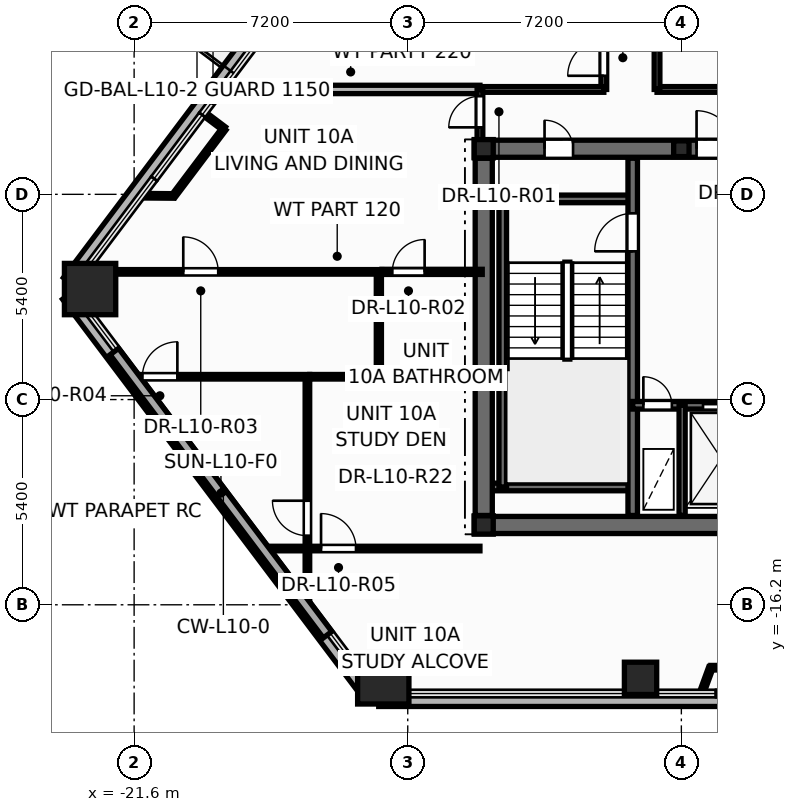
"""IFC4 building model, lengths in metres.
Left out: names, types, materials, properties, quantities, classifications, styles, units other than length and angle.
Written with IfcOpenShell. Run it as: python <this file> out.ifc"""

import sys

from ifc_helpers import new_model, si_unit, direction, frame, frame_2d, origin, origin_2d, place, context, subcontext, project, spatial, rectangle, hollow_rectangle, hollow_circle, i_section, extrude, element, fill, save


model = new_model("IFC4")
c1 = context("Model", 3, precision=1e-05, world=origin(), true_north=direction((0.0, 1.0)))
c2 = subcontext(c1, "Body", "Model", "MODEL_VIEW")
j1 = project(units=[si_unit("LENGTHUNIT", "METRE"), si_unit("PLANEANGLEUNIT", "RADIAN")], contexts=[c1])
p1 = place(None, origin())
s1 = spatial("IfcSite", under=j1, at=p1, CompositionType="ELEMENT")
p2 = place(p1, origin())
s2 = spatial("IfcBuilding", under=s1, at=p2, CompositionType="ELEMENT")
p3 = place(p2, frame((0.0, 0.0, 42.3)))
s3 = spatial("IfcBuildingStorey", under=s2, at=p3, CompositionType="ELEMENT", Elevation=42.3)
for number, where, z_axis, x_axis in (
    (1, (-22.759, -7.892, 0.0), (0.0, 0.0, 1.0), (1.0, 0.0, 0.0)),
    (2, (-15.044, -18.135, 0.0), (0.0, 0.0, 1.0), (1.0, 0.0, 0.0)),
):
    element("IfcColumn", number, at=place(p3, frame(where, z_axis=z_axis, x_axis=x_axis)), inside=s3, PredefinedType="COLUMN", context=c2, shape_type="SweptSolid", body=[
        extrude(hollow_rectangle(XDim=1.35, YDim=1.35, WallThickness=0.065, at=origin_2d()), origin(), (0.0, 0.0, 1.0), 3.6),
    ])
p4 = place(p3, frame((-8.274, -18.135, 0.0), z_axis=(0.0, 0.0, 1.0), x_axis=(1.0, 0.0, 0.0)))
e3 = element("IfcColumn", 3, at=p4, inside=s3, PredefinedType="COLUMN", context=c2, shape_type="SweptSolid", body=[
    extrude(hollow_circle(Radius=0.425, WallThickness=0.038, at=origin_2d()), origin(), (0.0, 0.0, 1.0), 3.6),
])
for number, where, z_axis, x_axis in (
    (4, (-12.4, -14.1, 0.0), (0.0, 0.0, 1.0), (1.0, 0.0, 0.0)),
    (5, (-12.4, -4.2, 0.0), (0.0, 0.0, 1.0), (1.0, 0.0, 0.0)),
):
    element("IfcColumn", number, at=place(p3, frame(where, z_axis=z_axis, x_axis=x_axis)), inside=s3, PredefinedType="COLUMN", context=c2, shape_type="SweptSolid", body=[
        extrude(i_section(OverallWidth=0.5, OverallDepth=0.482, WebThickness=0.04, FlangeThickness=0.045, at=origin_2d()), origin(), (0.0, 0.0, 1.0), 3.6),
    ])
p5 = place(p3, frame((-7.2, -4.2, 0.0), z_axis=(0.0, 0.0, 1.0), x_axis=(1.0, 0.0, 0.0)))
e6 = element("IfcColumn", 6, at=p5, inside=s3, PredefinedType="PILASTER", context=c2, shape_type="SweptSolid", body=[
    extrude(i_section(OverallWidth=0.405, OverallDepth=0.414, WebThickness=0.022, FlangeThickness=0.032, at=origin_2d()), origin(), (0.0, 0.0, 1.0), 3.6),
])
p6 = place(p3, frame((-23.34, -8.052, -0.2), z_axis=(0.0, 0.0, 1.0), x_axis=(0.601636636194, -0.798769903032, 0.0)))
e7 = element("IfcWall", 7, at=p6, inside=s3, PredefinedType="PARAPET", context=c2, shape_type="SweptSolid", body=[
    extrude(rectangle(XDim=13.165, YDim=0.36, at=frame_2d((6.583, 0.0))), origin(), (0.0, 0.0, 1.0), 0.38),
])
p7 = place(p3, frame((-15.163, -18.696, -0.2), z_axis=(0.0, 0.0, 1.0), x_axis=(1.0, 0.0, 0.0)))
e8 = element("IfcWall", 8, at=p7, inside=s3, PredefinedType="PARAPET", context=c2, shape_type="SweptSolid", body=[
    extrude(rectangle(XDim=30.327, YDim=0.36, at=frame_2d((15.163, 0.0))), origin(), (0.0, 0.0, 1.0), 0.38),
])
p8 = place(p3, frame((-15.988, 2.029, -0.2), z_axis=(0.0, 0.0, 1.0), x_axis=(-0.601631217198, -0.798773984612, 0.0)))
e9 = element("IfcWall", 9, at=p8, inside=s3, PredefinedType="PARAPET", context=c2, shape_type="SweptSolid", body=[
    extrude(rectangle(XDim=12.18, YDim=0.36, at=frame_2d((6.09, 0.0))), origin(), (0.0, 0.0, 1.0), 0.38),
])
p9 = place(p3, frame((-12.65, -14.1, 0.0), z_axis=(0.0, 0.0, 1.0), x_axis=(1.0, 0.0, 0.0)))
e10 = element("IfcWall", 10, at=p9, inside=s3, PredefinedType="SHEAR", context=c2, shape_type="SweptSolid", body=[
    extrude(rectangle(XDim=25.3, YDim=0.45, at=frame_2d((12.65, 0.0))), origin(), (0.0, 0.0, 1.0), 3.6),
])
p10 = place(p3, frame((-12.65, -4.2, 0.0), z_axis=(0.0, 0.0, 1.0), x_axis=(1.0, 0.0, 0.0)))
e11 = element("IfcWall", 11, at=p10, inside=s3, PredefinedType="SHEAR", context=c2, shape_type="SweptSolid", body=[
    extrude(rectangle(XDim=25.3, YDim=0.45, at=frame_2d((12.65, 0.0))), origin(), (0.0, 0.0, 1.0), 3.6),
])
p11 = place(p10, frame((1.85, 0.0, 0.0)))
e12 = element("IfcOpeningElement", 12, at=p11, cuts=e11, PredefinedType="OPENING", context=c2, shape_type="SweptSolid", body=[
    extrude(rectangle(XDim=0.756, YDim=2.054, at=frame_2d((0.375, 1.027))), frame((0.0, 0.235, 0.0), z_axis=(0.0, -1.0, 0.0), x_axis=(1.0, 0.0, 0.0)), (0.0, 0.0, 1.0), 0.47),
])
p12 = place(p10, frame((21.85, 0.0, 0.0)))
e13 = element("IfcOpeningElement", 13, at=p12, cuts=e11, PredefinedType="OPENING", context=c2, shape_type="SweptSolid", body=[
    extrude(rectangle(XDim=0.756, YDim=2.054, at=frame_2d((0.375, 1.027))), frame((0.0, 0.235, 0.0), z_axis=(0.0, -1.0, 0.0), x_axis=(1.0, 0.0, 0.0)), (0.0, 0.0, 1.0), 0.47),
])
p13 = place(p10, frame((23.5, 0.0, 0.0)))
e14 = element("IfcOpeningElement", 14, at=p13, cuts=e11, PredefinedType="OPENING", context=c2, shape_type="SweptSolid", body=[
    extrude(rectangle(XDim=0.756, YDim=2.054, at=frame_2d((0.375, 1.027))), frame((0.0, 0.235, 0.0), z_axis=(0.0, -1.0, 0.0), x_axis=(1.0, 0.0, 0.0)), (0.0, 0.0, 1.0), 0.47),
])
p14 = place(p10, frame((5.85, 0.0, 0.0)))
e15 = element("IfcOpeningElement", 15, at=p14, cuts=e11, PredefinedType="OPENING", context=c2, shape_type="SweptSolid", body=[
    extrude(rectangle(XDim=1.006, YDim=2.104, at=frame_2d((0.5, 1.052))), frame((0.0, 0.235, 0.0), z_axis=(0.0, -1.0, 0.0), x_axis=(1.0, 0.0, 0.0)), (0.0, 0.0, 1.0), 0.47),
])
p15 = place(p10, frame((10.35, 0.0, 0.0)))
e16 = element("IfcOpeningElement", 16, at=p15, cuts=e11, PredefinedType="OPENING", context=c2, shape_type="SweptSolid", body=[
    extrude(rectangle(XDim=1.406, YDim=2.154, at=frame_2d((0.7, 1.077))), frame((0.0, 0.235, 0.0), z_axis=(0.0, -1.0, 0.0), x_axis=(1.0, 0.0, 0.0)), (0.0, 0.0, 1.0), 0.47),
])
p16 = place(p10, frame((18.45, 0.0, 0.0)))
e17 = element("IfcOpeningElement", 17, at=p16, cuts=e11, PredefinedType="OPENING", context=c2, shape_type="SweptSolid", body=[
    extrude(rectangle(XDim=1.006, YDim=2.104, at=frame_2d((0.5, 1.052))), frame((0.0, 0.235, 0.0), z_axis=(0.0, -1.0, 0.0), x_axis=(1.0, 0.0, 0.0)), (0.0, 0.0, 1.0), 0.47),
])
for number, where, z_axis, x_axis in (
    (18, (-12.35, -5.52, 0.0), (0.0, 0.0, 1.0), (1.0, 0.0, 0.0)),
    (19, (-12.35, -13.1, 0.0), (0.0, 0.0, 1.0), (1.0, 0.0, 0.0)),
):
    element("IfcWall", number, at=place(p3, frame(where, z_axis=z_axis, x_axis=x_axis)), inside=s3, PredefinedType="SOLIDWALL", context=c2, shape_type="SweptSolid", body=[
        extrude(rectangle(XDim=3.87, YDim=0.2, at=frame_2d((1.935, 0.0))), origin(), (0.0, 0.0, 1.0), 3.6),
    ])
p17 = place(p3, frame((-11.9, -13.1, 0.0), z_axis=(0.0, 0.0, 1.0), x_axis=(0.0, 1.0, 0.0)))
e20 = element("IfcWall", 20, at=p17, inside=s3, PredefinedType="SOLIDWALL", context=c2, shape_type="SweptSolid", body=[
    extrude(rectangle(XDim=7.58, YDim=0.2, at=frame_2d((3.79, 0.0))), origin(), (0.0, 0.0, 1.0), 3.6),
])
p18 = place(p3, frame((-8.48, -13.85, 0.0), z_axis=(0.0, 0.0, 1.0), x_axis=(0.0, 1.0, 0.0)))
e21 = element("IfcWall", 21, at=p18, inside=s3, PredefinedType="SHEAR", context=c2, shape_type="SweptSolid", body=[
    extrude(rectangle(XDim=9.4, YDim=0.25, at=frame_2d((4.7, 0.0))), origin(), (0.0, 0.0, 1.0), 3.6),
])
p19 = place(p18, frame((6.95, 0.0, 0.0)))
e22 = element("IfcOpeningElement", 22, at=p19, cuts=e21, PredefinedType="OPENING", context=c2, shape_type="SweptSolid", body=[
    extrude(rectangle(XDim=1.006, YDim=2.104, at=frame_2d((0.5, 1.052))), frame((0.0, 0.135, 0.0), z_axis=(0.0, -1.0, 0.0), x_axis=(1.0, 0.0, 0.0)), (0.0, 0.0, 1.0), 0.27),
])
p20 = place(p3, frame((-8.48, -10.95, 0.0), z_axis=(0.0, 0.0, 1.0), x_axis=(1.0, 0.0, 0.0)))
e23 = element("IfcWall", 23, at=p20, inside=s3, PredefinedType="SOLIDWALL", context=c2, shape_type="SweptSolid", body=[
    extrude(rectangle(XDim=3.36, YDim=0.2, at=frame_2d((1.68, 0.0))), origin(), (0.0, 0.0, 1.0), 3.6),
])
p21 = place(p20, frame((0.28, 0.0, 0.0)))
e24 = element("IfcOpeningElement", 24, at=p21, cuts=e23, PredefinedType="OPENING", context=c2, shape_type="SweptSolid", body=[
    extrude(rectangle(XDim=0.756, YDim=2.054, at=frame_2d((0.375, 1.027))), frame((0.0, 0.11, 0.0), z_axis=(0.0, -1.0, 0.0), x_axis=(1.0, 0.0, 0.0)), (0.0, 0.0, 1.0), 0.22),
])
p22 = place(p20, frame((1.85, 0.0, 0.0)))
e25 = element("IfcOpeningElement", 25, at=p22, cuts=e23, PredefinedType="OPENING", context=c2, shape_type="SweptSolid", body=[
    extrude(rectangle(XDim=1.106, YDim=2.104, at=frame_2d((0.55, 1.052))), frame((0.0, 0.11, 0.0), z_axis=(0.0, -1.0, 0.0), x_axis=(1.0, 0.0, 0.0)), (0.0, 0.0, 1.0), 0.22),
])
p23 = place(p3, frame((-7.18, -13.85, 0.0), z_axis=(0.0, 0.0, 1.0), x_axis=(0.0, 1.0, 0.0)))
e26 = element("IfcWall", 26, at=p23, inside=s3, PredefinedType="PARTITIONING", context=c2, shape_type="SweptSolid", body=[
    extrude(rectangle(XDim=2.9, YDim=0.16, at=frame_2d((1.45, 0.0))), origin(), (0.0, 0.0, 1.0), 2.375),
])
p24 = place(p3, frame((-12.4, -13.85, 0.0), z_axis=(0.0, 0.0, 1.0), x_axis=(0.0, 1.0, 0.0)))
e27 = element("IfcWall", 27, at=p24, inside=s3, PredefinedType="SHEAR", context=c2, shape_type="SweptSolid", body=[
    extrude(rectangle(XDim=9.4, YDim=0.45, at=frame_2d((4.7, 0.0))), origin(), (0.0, 0.0, 1.0), 3.6),
])
p25 = place(p3, frame((-22.919, -7.44, 0.0), z_axis=(0.0, 0.0, 1.0), x_axis=(1.0, 0.0, 0.0)))
e28 = element("IfcWall", 28, at=p25, inside=s3, PredefinedType="PARTITIONING", context=c2, shape_type="SweptSolid", body=[
    extrude(rectangle(XDim=7.839, YDim=0.12, at=frame_2d((3.919, 0.0))), origin(), (0.0, 0.0, 1.0), 2.325),
])
p26 = place(p25, frame((2.612, 0.0, 0.0)))
e29 = element("IfcOpeningElement", 29, at=p26, cuts=e28, PredefinedType="OPENING", context=c2, shape_type="SweptSolid", body=[
    extrude(rectangle(XDim=0.926, YDim=2.104, at=frame_2d((0.46, 1.052))), frame((0.0, 0.07, 0.0), z_axis=(0.0, -1.0, 0.0), x_axis=(1.0, 0.0, 0.0)), (0.0, 0.0, 1.0), 0.14),
])
p27 = place(p3, frame((-7.84, -2.64, 0.0), z_axis=(0.0, 0.0, 1.0), x_axis=(1.0, 0.0, 0.0)))
e30 = element("IfcWall", 30, at=p27, inside=s3, PredefinedType="PARTITIONING", context=c2, shape_type="SweptSolid", body=[
    extrude(rectangle(XDim=7.7, YDim=0.15, at=frame_2d((3.85, 0.0))), origin(), (0.0, 0.0, 1.0), 2.325),
])
p28 = place(p27, frame((2.117, 0.0, 0.0)))
e31 = element("IfcOpeningElement", 31, at=p28, cuts=e30, PredefinedType="OPENING", context=c2, shape_type="SweptSolid", body=[
    extrude(rectangle(XDim=0.956, YDim=2.104, at=frame_2d((0.475, 1.052))), frame((0.0, 0.085, 0.0), z_axis=(0.0, -1.0, 0.0), x_axis=(1.0, 0.0, 0.0)), (0.0, 0.0, 1.0), 0.17),
])
p29 = place(p3, frame((-9.24, -2.64, 0.0), z_axis=(0.0, 0.0, 1.0), x_axis=(0.0, 1.0, 0.0)))
e32 = element("IfcWall", 32, at=p29, inside=s3, PredefinedType="PARTITIONING", context=c2, shape_type="SweptSolid", body=[
    extrude(rectangle(XDim=6.9, YDim=0.15, at=frame_2d((3.45, 0.0))), origin(), (0.0, 0.0, 1.0), 2.509),
])
p30 = place(p29, frame((0.36, 0.0, 0.0)))
e33 = element("IfcOpeningElement", 33, at=p30, cuts=e32, PredefinedType="OPENING", context=c2, shape_type="SweptSolid", body=[
    extrude(rectangle(XDim=0.956, YDim=2.104, at=frame_2d((0.475, 1.052))), frame((0.0, 0.085, 0.0), z_axis=(0.0, -1.0, 0.0), x_axis=(1.0, 0.0, 0.0)), (0.0, 0.0, 1.0), 0.17),
])
p31 = place(p3, frame((-19.304, -2.64, 0.0), z_axis=(0.0, 0.0, 1.0), x_axis=(1.0, 0.0, 0.0)))
e34 = element("IfcWall", 34, at=p31, inside=s3, PredefinedType="PARTITIONING", context=c2, shape_type="SweptSolid", body=[
    extrude(rectangle(XDim=6.804, YDim=0.22, at=frame_2d((3.402, 0.0))), origin(), (0.0, 0.0, 1.0), 2.713),
])
p32 = place(p3, frame((-7.84, -2.64, 0.0), z_axis=(0.0, 0.0, 1.0), x_axis=(0.0, 1.0, 0.0)))
e35 = element("IfcWall", 35, at=p32, inside=s3, PredefinedType="PARTITIONING", context=c2, shape_type="SweptSolid", body=[
    extrude(rectangle(XDim=8.84, YDim=0.15, at=frame_2d((4.42, 0.0))), origin(), (0.0, 0.0, 1.0), 2.509),
])
p33 = place(p3, frame((-17.04, -16.15, 0.0), z_axis=(0.0, 0.0, 1.0), x_axis=(0.0, 1.0, 0.0)))
e36 = element("IfcWall", 36, at=p33, inside=s3, PredefinedType="PARTITIONING", context=c2, shape_type="SweptSolid", body=[
    extrude(rectangle(XDim=5.95, YDim=0.12, at=frame_2d((2.975, 0.0))), origin(), (0.0, 0.0, 1.0), 2.713),
])
p34 = place(p33, frame((1.769, 0.0, 0.0)))
e37 = element("IfcOpeningElement", 37, at=p34, cuts=e36, PredefinedType="OPENING", context=c2, shape_type="SweptSolid", body=[
    extrude(rectangle(XDim=0.926, YDim=2.104, at=frame_2d((0.46, 1.052))), frame((0.0, 0.07, 0.0), z_axis=(0.0, -1.0, 0.0), x_axis=(1.0, 0.0, 0.0)), (0.0, 0.0, 1.0), 0.14),
])
p35 = place(p3, frame((-18.117, -14.72, 0.0), z_axis=(0.0, 0.0, 1.0), x_axis=(1.0, 0.0, 0.0)))
e38 = element("IfcWall", 38, at=p35, inside=s3, PredefinedType="PARTITIONING", context=c2, shape_type="SweptSolid", body=[
    extrude(rectangle(XDim=5.617, YDim=0.12, at=frame_2d((2.809, 0.0))), origin(), (0.0, 0.0, 1.0), 2.713),
])
p36 = place(p35, frame((1.436, 0.0, 0.0)))
e39 = element("IfcOpeningElement", 39, at=p36, cuts=e38, PredefinedType="OPENING", context=c2, shape_type="SweptSolid", body=[
    extrude(rectangle(XDim=0.926, YDim=2.104, at=frame_2d((0.46, 1.052))), frame((0.0, 0.07, 0.0), z_axis=(0.0, -1.0, 0.0), x_axis=(1.0, 0.0, 0.0)), (0.0, 0.0, 1.0), 0.14),
])
p37 = place(p3, frame((-21.522, -10.2, 0.0), z_axis=(0.0, 0.0, 1.0), x_axis=(1.0, 0.0, 0.0)))
e40 = element("IfcWall", 40, at=p37, inside=s3, PredefinedType="PARTITIONING", context=c2, shape_type="SweptSolid", body=[
    extrude(rectangle(XDim=4.542, YDim=0.12, at=frame_2d((2.271, 0.0))), origin(), (0.0, 0.0, 1.0), 2.713),
])
p38 = place(p37, frame((0.14, 0.0, 0.0)))
e41 = element("IfcOpeningElement", 41, at=p38, cuts=e40, PredefinedType="OPENING", context=c2, shape_type="SweptSolid", body=[
    extrude(rectangle(XDim=0.926, YDim=2.104, at=frame_2d((0.46, 1.052))), frame((0.0, 0.07, 0.0), z_axis=(0.0, -1.0, 0.0), x_axis=(1.0, 0.0, 0.0)), (0.0, 0.0, 1.0), 0.14),
])
p39 = place(p3, frame((-6.425, -17.856, 0.0), z_axis=(0.0, 0.0, 1.0), x_axis=(1.0, 0.0, 0.0)))
e42 = element("IfcWall", 42, at=p39, inside=s3, PredefinedType="PARTITIONING", context=c2, shape_type="SweptSolid", body=[
    extrude(rectangle(XDim=3.868, YDim=0.12, at=frame_2d((1.934, 0.0))), origin(), (0.0, 0.0, 1.0), 3.35),
])
p40 = place(p3, frame((-12.5, -2.64, 0.0), z_axis=(0.0, 0.0, 1.0), x_axis=(1.0, 0.0, 0.0)))
e43 = element("IfcWall", 43, at=p40, inside=s3, PredefinedType="PARTITIONING", context=c2, shape_type="SweptSolid", body=[
    extrude(rectangle(XDim=3.26, YDim=0.15, at=frame_2d((1.63, 0.0))), origin(), (0.0, 0.0, 1.0), 3.35),
])
p41 = place(p3, frame((-15.078, -7.44, 0.0), z_axis=(0.0, 0.0, 1.0), x_axis=(1.0, 0.0, 0.0)))
e44 = element("IfcWall", 44, at=p41, inside=s3, PredefinedType="PARTITIONING", context=c2, shape_type="SweptSolid", body=[
    extrude(rectangle(XDim=2.638, YDim=0.135, at=frame_2d((1.319, 0.0))), origin(), (0.0, 0.0, 1.0), 2.713),
])
p42 = place(p41, frame((0.272, 0.0, 0.0)))
e45 = element("IfcOpeningElement", 45, at=p42, cuts=e44, PredefinedType="OPENING", context=c2, shape_type="SweptSolid", body=[
    extrude(rectangle(XDim=0.856, YDim=2.104, at=frame_2d((0.425, 1.052))), frame((0.0, 0.078, 0.0), z_axis=(0.0, -1.0, 0.0), x_axis=(1.0, 0.0, 0.0)), (0.0, 0.0, 1.0), 0.155),
])
p43 = place(p3, frame((-15.16, -10.2, 0.0), z_axis=(0.0, 0.0, 1.0), x_axis=(0.0, 1.0, 0.0)))
e46 = element("IfcWall", 46, at=p43, inside=s3, PredefinedType="PARTITIONING", context=c2, shape_type="SweptSolid", body=[
    extrude(rectangle(XDim=2.76, YDim=0.135, at=frame_2d((1.38, 0.0))), origin(), (0.0, 0.0, 1.0), 3.35),
])
p44 = place(p3, frame((-15.16, -10.2, 0.0), z_axis=(0.0, 0.0, 1.0), x_axis=(1.0, 0.0, 0.0)))
e47 = element("IfcWall", 47, at=p44, inside=s3, PredefinedType="PARTITIONING", context=c2, shape_type="SweptSolid", body=[
    extrude(rectangle(XDim=2.72, YDim=0.135, at=frame_2d((1.36, 0.0))), origin(), (0.0, 0.0, 1.0), 2.713),
])
p45 = place(p3, frame((-19.231, -3.674, 0.0), z_axis=(0.0, 0.0, 1.0), x_axis=(-0.60167490335, -0.798741078622, 0.0)))
e48 = element("IfcWall", 48, at=p45, inside=s3, PredefinedType="PARTITIONING", context=c2, shape_type="SweptSolid", body=[
    extrude(rectangle(XDim=2.214, YDim=0.12, at=frame_2d((1.107, 0.0))), origin(), (0.0, 0.0, 1.0), 3.35),
])
p46 = place(p3, frame((-16.978, -10.2, 0.0), z_axis=(0.0, 0.0, 1.0), x_axis=(1.0, 0.0, 0.0)))
e49 = element("IfcWall", 49, at=p46, inside=s3, PredefinedType="PARTITIONING", context=c2, shape_type="SweptSolid", body=[
    extrude(rectangle(XDim=1.818, YDim=0.12, at=frame_2d((0.909, 0.0))), origin(), (0.0, 0.0, 1.0), 3.35),
])
p47 = place(p3, frame((-12.5, -4.24, 0.0), z_axis=(0.0, 0.0, 1.0), x_axis=(0.0, 1.0, 0.0)))
e50 = element("IfcWall", 50, at=p47, inside=s3, PredefinedType="PARTITIONING", context=c2, shape_type="SweptSolid", body=[
    extrude(rectangle(XDim=1.6, YDim=0.15, at=frame_2d((0.8, 0.0))), origin(), (0.0, 0.0, 1.0), 2.325),
])
p48 = place(p47, frame((0.602, 0.0, 0.0)))
e51 = element("IfcOpeningElement", 51, at=p48, cuts=e50, PredefinedType="OPENING", context=c2, shape_type="SweptSolid", body=[
    extrude(rectangle(XDim=0.826, YDim=2.104, at=frame_2d((0.41, 1.052))), frame((0.0, 0.085, 0.0), z_axis=(0.0, -1.0, 0.0), x_axis=(1.0, 0.0, 0.0)), (0.0, 0.0, 1.0), 0.17),
])
p49 = place(p3, frame((-20.563, -5.442, 0.0), z_axis=(0.0, 0.0, 1.0), x_axis=(-0.999971035762, 0.007611020764, 0.0)))
e52 = element("IfcWall", 52, at=p49, inside=s3, PredefinedType="PARTITIONING", context=c2, shape_type="SweptSolid", body=[
    extrude(rectangle(XDim=0.834, YDim=0.12, at=frame_2d((0.417, 0.0))), origin(), (0.0, 0.0, 1.0), 2.713),
])
p50 = place(p3, frame((-6.671, -18.526, 0.0), z_axis=(0.0, 0.0, 1.0), x_axis=(0.344516001637, 0.938780445374, 0.0)))
e53 = element("IfcWall", 53, at=p50, inside=s3, PredefinedType="PARTITIONING", context=c2, shape_type="SweptSolid", body=[
    extrude(rectangle(XDim=0.714, YDim=0.12, at=frame_2d((0.357, 0.0))), origin(), (0.0, 0.0, 1.0), 2.713),
])
p51 = place(p3, frame((-19.767, -3.271, 0.0), z_axis=(0.0, 0.0, 1.0), x_axis=(0.798905778506, -0.601456197133, 0.0)))
e54 = element("IfcWall", 54, at=p51, inside=s3, PredefinedType="PARTITIONING", context=c2, shape_type="SweptSolid", body=[
    extrude(rectangle(XDim=0.67, YDim=0.12, at=frame_2d((0.335, 0.0))), origin(), (0.0, 0.0, 1.0), 2.713),
])
p52 = place(p19, origin())
e55 = element("IfcDoor", 55, at=p52, inside=s3, OperationType="SINGLE_SWING_LEFT", PredefinedType="DOOR", context=c2, shape_type="SweptSolid", body=[
    extrude(rectangle(XDim=1.0, YDim=2.1, at=frame_2d((0.5, 1.05))), frame((0.0, 0.025, 0.0), z_axis=(0.0, -1.0, 0.0), x_axis=(1.0, 0.0, 0.0)), (0.0, 0.0, 1.0), 0.05),
])
fill(e22, e55)
p53 = place(p21, origin())
e56 = element("IfcDoor", 56, at=p53, inside=s3, OperationType="SINGLE_SWING_LEFT", PredefinedType="DOOR", context=c2, shape_type="SweptSolid", body=[
    extrude(rectangle(XDim=0.75, YDim=2.05, at=frame_2d((0.375, 1.025))), frame((0.0, 0.025, 0.0), z_axis=(0.0, -1.0, 0.0), x_axis=(1.0, 0.0, 0.0)), (0.0, 0.0, 1.0), 0.05),
])
fill(e24, e56)
p54 = place(p22, origin())
e57 = element("IfcDoor", 57, at=p54, inside=s3, OperationType="DOUBLE_DOOR_SLIDING", PredefinedType="DOOR", context=c2, shape_type="SweptSolid", body=[
    extrude(rectangle(XDim=1.1, YDim=2.1, at=frame_2d((0.55, 1.05))), frame((0.0, 0.025, 0.0), z_axis=(0.0, -1.0, 0.0), x_axis=(1.0, 0.0, 0.0)), (0.0, 0.0, 1.0), 0.05),
])
fill(e25, e57)
p55 = place(p11, origin())
e58 = element("IfcDoor", 58, at=p55, inside=s3, OperationType="SINGLE_SWING_LEFT", PredefinedType="DOOR", context=c2, shape_type="SweptSolid", body=[
    extrude(rectangle(XDim=0.75, YDim=2.05, at=frame_2d((0.375, 1.025))), frame((0.0, 0.025, 0.0), z_axis=(0.0, -1.0, 0.0), x_axis=(1.0, 0.0, 0.0)), (0.0, 0.0, 1.0), 0.05),
])
fill(e12, e58)
p56 = place(p14, origin())
e59 = element("IfcDoor", 59, at=p56, inside=s3, OperationType="SINGLE_SWING_LEFT", PredefinedType="DOOR", context=c2, shape_type="SweptSolid", body=[
    extrude(rectangle(XDim=1.0, YDim=2.1, at=frame_2d((0.5, 1.05))), frame((0.0, 0.025, 0.0), z_axis=(0.0, -1.0, 0.0), x_axis=(1.0, 0.0, 0.0)), (0.0, 0.0, 1.0), 0.05),
])
fill(e15, e59)
p57 = place(p48, origin())
e60 = element("IfcDoor", 60, at=p57, inside=s3, OperationType="SINGLE_SWING_LEFT", PredefinedType="DOOR", context=c2, shape_type="SweptSolid", body=[
    extrude(rectangle(XDim=0.82, YDim=2.1, at=frame_2d((0.41, 1.05))), frame((0.0, 0.025, 0.0), z_axis=(0.0, -1.0, 0.0), x_axis=(1.0, 0.0, 0.0)), (0.0, 0.0, 1.0), 0.05),
])
fill(e51, e60)
p58 = place(p42, origin())
e61 = element("IfcDoor", 61, at=p58, inside=s3, OperationType="SINGLE_SWING_RIGHT", PredefinedType="DOOR", context=c2, shape_type="SweptSolid", body=[
    extrude(rectangle(XDim=0.85, YDim=2.1, at=frame_2d((0.425, 1.05))), frame((0.0, 0.025, 0.0), z_axis=(0.0, -1.0, 0.0), x_axis=(1.0, 0.0, 0.0)), (0.0, 0.0, 1.0), 0.05),
])
fill(e45, e61)
p59 = place(p26, origin())
e62 = element("IfcDoor", 62, at=p59, inside=s3, OperationType="SINGLE_SWING_LEFT", PredefinedType="DOOR", context=c2, shape_type="SweptSolid", body=[
    extrude(rectangle(XDim=0.92, YDim=2.1, at=frame_2d((0.46, 1.05))), frame((0.0, 0.025, 0.0), z_axis=(0.0, -1.0, 0.0), x_axis=(1.0, 0.0, 0.0)), (0.0, 0.0, 1.0), 0.05),
])
fill(e29, e62)
p60 = place(p38, origin())
e63 = element("IfcDoor", 63, at=p60, inside=s3, OperationType="SINGLE_SWING_RIGHT", PredefinedType="DOOR", context=c2, shape_type="SweptSolid", body=[
    extrude(rectangle(XDim=0.92, YDim=2.1, at=frame_2d((0.46, 1.05))), frame((0.0, 0.025, 0.0), z_axis=(0.0, -1.0, 0.0), x_axis=(1.0, 0.0, 0.0)), (0.0, 0.0, 1.0), 0.05),
])
fill(e41, e63)
p61 = place(p36, origin())
e64 = element("IfcDoor", 64, at=p61, inside=s3, OperationType="SINGLE_SWING_LEFT", PredefinedType="DOOR", context=c2, shape_type="SweptSolid", body=[
    extrude(rectangle(XDim=0.92, YDim=2.1, at=frame_2d((0.46, 1.05))), frame((0.0, 0.025, 0.0), z_axis=(0.0, -1.0, 0.0), x_axis=(1.0, 0.0, 0.0)), (0.0, 0.0, 1.0), 0.05),
])
fill(e39, e64)
p62 = place(p30, origin())
e65 = element("IfcDoor", 65, at=p62, inside=s3, OperationType="SINGLE_SWING_LEFT", PredefinedType="DOOR", context=c2, shape_type="SweptSolid", body=[
    extrude(rectangle(XDim=0.95, YDim=2.1, at=frame_2d((0.475, 1.05))), frame((0.0, 0.025, 0.0), z_axis=(0.0, -1.0, 0.0), x_axis=(1.0, 0.0, 0.0)), (0.0, 0.0, 1.0), 0.05),
])
fill(e33, e65)
p63 = place(p34, origin())
e66 = element("IfcDoor", 66, at=p63, inside=s3, OperationType="SINGLE_SWING_RIGHT", PredefinedType="DOOR", context=c2, shape_type="SweptSolid", body=[
    extrude(rectangle(XDim=0.92, YDim=2.1, at=frame_2d((0.46, 1.05))), frame((0.0, 0.025, 0.0), z_axis=(0.0, -1.0, 0.0), x_axis=(1.0, 0.0, 0.0)), (0.0, 0.0, 1.0), 0.05),
])
fill(e37, e66)
save(model, sys.argv[1])
